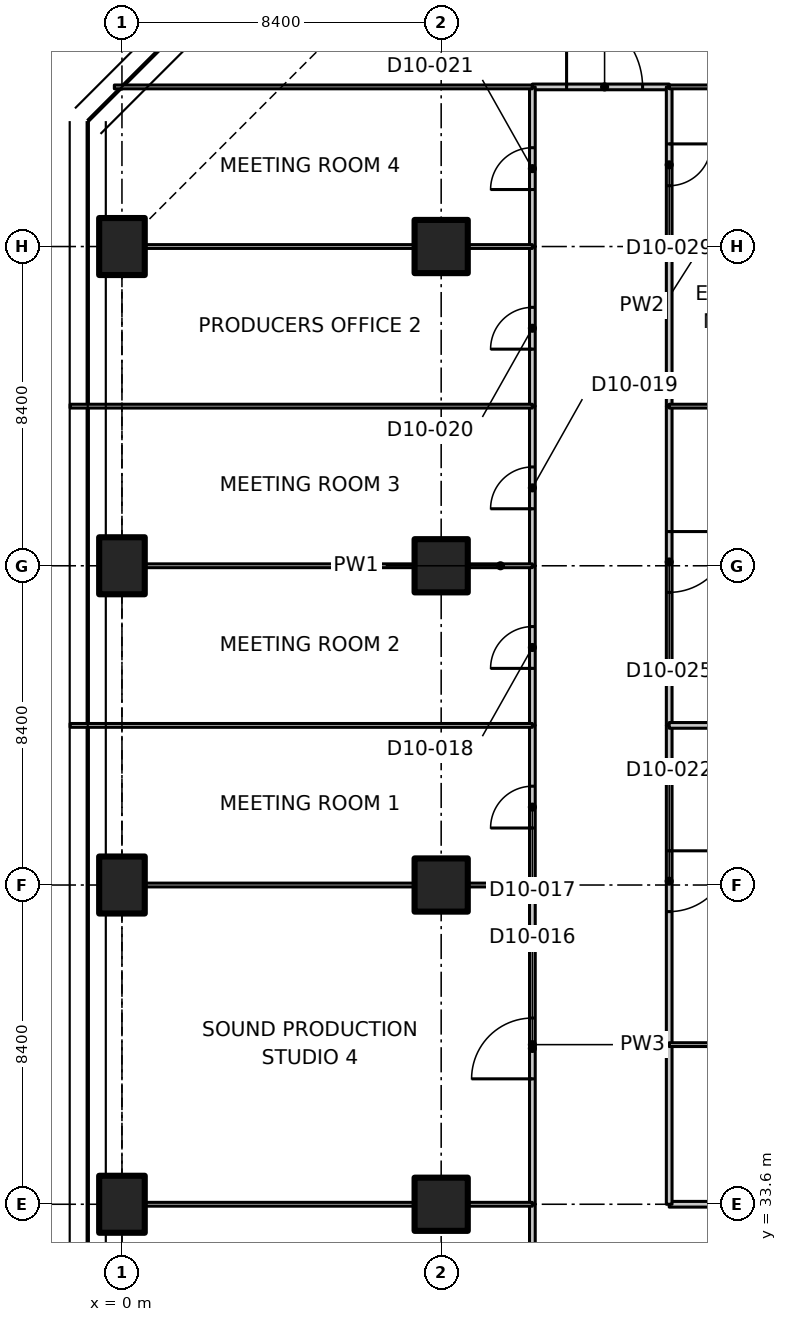
"""IFC4 building model, lengths in metres.
Left out: names, types, materials, properties, quantities, classifications, styles, units other than length and angle.
Written with IfcOpenShell. Run it as: python <this file> out.ifc"""

import sys

from ifc_helpers import new_model, si_unit, direction, frame, frame_2d, origin, origin_2d, place, context, subcontext, project, spatial, polyline, rectangle, outline, extrude, element, fill, save


model = new_model("IFC4")
c1 = context("Model", 3, precision=1e-05, world=origin(), true_north=direction((0.0, 1.0)))
c2 = subcontext(c1, "Body", "Model", "MODEL_VIEW")
j1 = project(units=[si_unit("LENGTHUNIT", "METRE"), si_unit("PLANEANGLEUNIT", "RADIAN")], contexts=[c1])
p1 = place(None, origin())
s1 = spatial("IfcSite", under=j1, at=p1, CompositionType="ELEMENT")
p2 = place(p1, origin())
s2 = spatial("IfcBuilding", under=s1, at=p2, CompositionType="ELEMENT")
p3 = place(p2, frame((0.0, 0.0, 76.1)))
s3 = spatial("IfcBuildingStorey", under=s2, at=p3, CompositionType="ELEMENT", Elevation=76.1)
for number, where, z_axis, x_axis in (
    (1, (0.0, 33.6, 0.0), (0.0, 0.0, 1.0), (1.0, 0.0, 0.0)),
    (2, (0.0, 42.0, 0.0), (0.0, 0.0, 1.0), (1.0, 0.0, 0.0)),
    (3, (0.0, 50.4, 0.0), (0.0, 0.0, 1.0), (1.0, 0.0, 0.0)),
    (4, (0.0, 58.8, 0.0), (0.0, 0.0, 1.0), (1.0, 0.0, 0.0)),
):
    element("IfcColumn", number, at=place(p3, frame(where, z_axis=z_axis, x_axis=x_axis)), inside=s3, PredefinedType="COLUMN", context=c2, shape_type="SweptSolid", body=[
        extrude(rectangle(XDim=1.2, YDim=1.5, at=origin_2d()), origin(), (0.0, 0.0, 1.0), 3.35),
    ])
for number, where, z_axis, x_axis in (
    (5, (8.4, 33.6, 0.0), (0.0, 0.0, 1.0), (1.0, 0.0, 0.0)),
    (6, (8.4, 42.0, 0.0), (0.0, 0.0, 1.0), (1.0, 0.0, 0.0)),
    (7, (8.4, 50.4, 0.0), (0.0, 0.0, 1.0), (1.0, 0.0, 0.0)),
    (8, (8.4, 58.8, 0.0), (0.0, 0.0, 1.0), (1.0, 0.0, 0.0)),
):
    element("IfcColumn", number, at=place(p3, frame(where, z_axis=z_axis, x_axis=x_axis)), inside=s3, PredefinedType="COLUMN", context=c2, shape_type="SweptSolid", body=[
        extrude(rectangle(XDim=1.4, YDim=1.4, at=origin_2d()), origin(), (0.0, 0.0, 1.0), 3.35),
    ])
p4 = place(p3, frame((10.8, 25.2, 0.0), z_axis=(0.0, 0.0, 1.0), x_axis=(0.0, 1.0, 0.0)))
e9 = element("IfcWall", 9, at=p4, inside=s3, PredefinedType="PARTITIONING", context=c2, shape_type="SweptSolid", body=[
    extrude(rectangle(XDim=8.4, YDim=0.15, at=frame_2d((4.2, 0.0))), origin(), (0.0, 0.0, 1.0), 3.33),
])
p5 = place(p4, frame((3.3, 0.0, 0.0)))
e10 = element("IfcOpeningElement", 10, at=p5, cuts=e9, PredefinedType="OPENING", context=c2, shape_type="SweptSolid", body=[
    extrude(rectangle(XDim=1.6, YDim=2.1, at=frame_2d((0.8, 1.05))), frame((0.0, 0.085, 0.0), z_axis=(0.0, -1.0, 0.0), x_axis=(1.0, 0.0, 0.0)), (0.0, 0.0, 1.0), 0.17),
])
p6 = place(p3, frame((14.4, 33.6, 0.0), z_axis=(0.0, 0.0, 1.0), x_axis=(1.0, 0.0, 0.0)))
e11 = element("IfcWall", 11, at=p6, inside=s3, PredefinedType="PARTITIONING", context=c2, shape_type="SweptSolid", body=[
    extrude(rectangle(XDim=1.5, YDim=0.15, at=frame_2d((0.75, 0.0))), origin(), (0.0, 0.0, 1.0), 3.33),
])
p7 = place(p3, frame((10.8, 63.0, 0.0), z_axis=(0.0, 0.0, 1.0), x_axis=(1.0, 0.0, 0.0)))
e12 = element("IfcWall", 12, at=p7, inside=s3, PredefinedType="PARTITIONING", context=c2, shape_type="SweptSolid", body=[
    extrude(rectangle(XDim=3.6, YDim=0.15, at=frame_2d((1.8, 0.0))), origin(), (0.0, 0.0, 1.0), 3.33),
])
p8 = place(p7, frame((0.9, 0.0, 0.0)))
e13 = element("IfcOpeningElement", 13, at=p8, cuts=e12, PredefinedType="OPENING", context=c2, shape_type="SweptSolid", body=[
    extrude(rectangle(XDim=2.0, YDim=2.4, at=frame_2d((1.0, 1.2))), frame((0.0, 0.085, 0.0), z_axis=(0.0, -1.0, 0.0), x_axis=(1.0, 0.0, 0.0)), (0.0, 0.0, 1.0), 0.17),
])
p9 = place(p3, frame((10.8, 33.6, 0.0), z_axis=(0.0, 0.0, 1.0), x_axis=(0.0, 1.0, 0.0)))
e14 = element("IfcWall", 14, at=p9, inside=s3, PredefinedType="PARTITIONING", context=c2, shape_type="SweptSolid", body=[
    extrude(rectangle(XDim=8.4, YDim=0.15, at=frame_2d((4.2, 0.0))), origin(), (0.0, 0.0, 1.0), 3.33),
])
p10 = place(p9, frame((3.3, 0.0, 0.0)))
e15 = element("IfcOpeningElement", 15, at=p10, cuts=e14, PredefinedType="OPENING", context=c2, shape_type="SweptSolid", body=[
    extrude(rectangle(XDim=1.6, YDim=2.1, at=frame_2d((0.8, 1.05))), frame((0.0, 0.085, 0.0), z_axis=(0.0, -1.0, 0.0), x_axis=(1.0, 0.0, 0.0)), (0.0, 0.0, 1.0), 0.17),
])
p11 = place(p3, frame((10.8, 42.0, 0.0), z_axis=(0.0, 0.0, 1.0), x_axis=(0.0, 1.0, 0.0)))
e16 = element("IfcWall", 16, at=p11, inside=s3, PredefinedType="PARTITIONING", context=c2, shape_type="SweptSolid", body=[
    extrude(rectangle(XDim=4.2, YDim=0.15, at=frame_2d((2.1, 0.0))), origin(), (0.0, 0.0, 1.0), 3.33),
])
p12 = place(p11, frame((1.5, 0.0, 0.0)))
e17 = element("IfcOpeningElement", 17, at=p12, cuts=e16, PredefinedType="OPENING", context=c2, shape_type="SweptSolid", body=[
    extrude(rectangle(XDim=1.1, YDim=2.1, at=frame_2d((0.55, 1.05))), frame((0.0, 0.085, 0.0), z_axis=(0.0, -1.0, 0.0), x_axis=(1.0, 0.0, 0.0)), (0.0, 0.0, 1.0), 0.17),
])
p13 = place(p3, frame((10.8, 46.2, 0.0), z_axis=(0.0, 0.0, 1.0), x_axis=(0.0, 1.0, 0.0)))
e18 = element("IfcWall", 18, at=p13, inside=s3, PredefinedType="PARTITIONING", context=c2, shape_type="SweptSolid", body=[
    extrude(rectangle(XDim=4.2, YDim=0.15, at=frame_2d((2.1, 0.0))), origin(), (0.0, 0.0, 1.0), 3.33),
])
p14 = place(p13, frame((1.5, 0.0, 0.0)))
e19 = element("IfcOpeningElement", 19, at=p14, cuts=e18, PredefinedType="OPENING", context=c2, shape_type="SweptSolid", body=[
    extrude(rectangle(XDim=1.1, YDim=2.1, at=frame_2d((0.55, 1.05))), frame((0.0, 0.085, 0.0), z_axis=(0.0, -1.0, 0.0), x_axis=(1.0, 0.0, 0.0)), (0.0, 0.0, 1.0), 0.17),
])
p15 = place(p3, frame((10.8, 50.4, 0.0), z_axis=(0.0, 0.0, 1.0), x_axis=(0.0, 1.0, 0.0)))
e20 = element("IfcWall", 20, at=p15, inside=s3, PredefinedType="PARTITIONING", context=c2, shape_type="SweptSolid", body=[
    extrude(rectangle(XDim=4.2, YDim=0.15, at=frame_2d((2.1, 0.0))), origin(), (0.0, 0.0, 1.0), 3.33),
])
p16 = place(p15, frame((1.5, 0.0, 0.0)))
e21 = element("IfcOpeningElement", 21, at=p16, cuts=e20, PredefinedType="OPENING", context=c2, shape_type="SweptSolid", body=[
    extrude(rectangle(XDim=1.1, YDim=2.1, at=frame_2d((0.55, 1.05))), frame((0.0, 0.085, 0.0), z_axis=(0.0, -1.0, 0.0), x_axis=(1.0, 0.0, 0.0)), (0.0, 0.0, 1.0), 0.17),
])
p17 = place(p3, frame((10.8, 54.6, 0.0), z_axis=(0.0, 0.0, 1.0), x_axis=(0.0, 1.0, 0.0)))
e22 = element("IfcWall", 22, at=p17, inside=s3, PredefinedType="PARTITIONING", context=c2, shape_type="SweptSolid", body=[
    extrude(rectangle(XDim=4.2, YDim=0.15, at=frame_2d((2.1, 0.0))), origin(), (0.0, 0.0, 1.0), 3.33),
])
p18 = place(p17, frame((1.5, 0.0, 0.0)))
e23 = element("IfcOpeningElement", 23, at=p18, cuts=e22, PredefinedType="OPENING", context=c2, shape_type="SweptSolid", body=[
    extrude(rectangle(XDim=1.1, YDim=2.1, at=frame_2d((0.55, 1.05))), frame((0.0, 0.085, 0.0), z_axis=(0.0, -1.0, 0.0), x_axis=(1.0, 0.0, 0.0)), (0.0, 0.0, 1.0), 0.17),
])
p19 = place(p3, frame((10.8, 58.8, 0.0), z_axis=(0.0, 0.0, 1.0), x_axis=(0.0, 1.0, 0.0)))
e24 = element("IfcWall", 24, at=p19, inside=s3, PredefinedType="PARTITIONING", context=c2, shape_type="SweptSolid", body=[
    extrude(rectangle(XDim=4.2, YDim=0.15, at=frame_2d((2.1, 0.0))), origin(), (0.0, 0.0, 1.0), 3.33),
])
p20 = place(p19, frame((1.5, 0.0, 0.0)))
e25 = element("IfcOpeningElement", 25, at=p20, cuts=e24, PredefinedType="OPENING", context=c2, shape_type="SweptSolid", body=[
    extrude(rectangle(XDim=1.1, YDim=2.1, at=frame_2d((0.55, 1.05))), frame((0.0, 0.085, 0.0), z_axis=(0.0, -1.0, 0.0), x_axis=(1.0, 0.0, 0.0)), (0.0, 0.0, 1.0), 0.17),
])
p21 = place(p3, frame((14.4, 46.2, 0.0), z_axis=(0.0, 0.0, 1.0), x_axis=(0.0, -1.0, 0.0)))
e26 = element("IfcWall", 26, at=p21, inside=s3, PredefinedType="PARTITIONING", context=c2, shape_type="SweptSolid", body=[
    extrude(rectangle(XDim=8.4, YDim=0.15, at=frame_2d((4.2, 0.0))), origin(), (0.0, 0.0, 1.0), 3.33),
])
p22 = place(p21, frame((3.3, 0.0, 0.0)))
e27 = element("IfcOpeningElement", 27, at=p22, cuts=e26, PredefinedType="OPENING", context=c2, shape_type="SweptSolid", body=[
    extrude(rectangle(XDim=1.6, YDim=2.1, at=frame_2d((0.8, 1.05))), frame((0.0, 0.085, 0.0), z_axis=(0.0, -1.0, 0.0), x_axis=(1.0, 0.0, 0.0)), (0.0, 0.0, 1.0), 0.17),
])
p23 = place(p3, frame((14.4, 37.8, 0.0), z_axis=(0.0, 0.0, 1.0), x_axis=(0.0, -1.0, 0.0)))
e28 = element("IfcWall", 28, at=p23, inside=s3, PredefinedType="PARTITIONING", context=c2, shape_type="SweptSolid", body=[
    extrude(rectangle(XDim=4.2, YDim=0.15, at=frame_2d((2.1, 0.0))), origin(), (0.0, 0.0, 1.0), 3.33),
])
p24 = place(p3, frame((14.4, 54.6, 0.0), z_axis=(0.0, 0.0, 1.0), x_axis=(0.0, -1.0, 0.0)))
e29 = element("IfcWall", 29, at=p24, inside=s3, PredefinedType="PARTITIONING", context=c2, shape_type="SweptSolid", body=[
    extrude(rectangle(XDim=8.4, YDim=0.15, at=frame_2d((4.2, 0.0))), origin(), (0.0, 0.0, 1.0), 3.33),
])
p25 = place(p24, frame((3.3, 0.0, 0.0)))
e30 = element("IfcOpeningElement", 30, at=p25, cuts=e29, PredefinedType="OPENING", context=c2, shape_type="SweptSolid", body=[
    extrude(rectangle(XDim=1.6, YDim=2.1, at=frame_2d((0.8, 1.05))), frame((0.0, 0.085, 0.0), z_axis=(0.0, -1.0, 0.0), x_axis=(1.0, 0.0, 0.0)), (0.0, 0.0, 1.0), 0.17),
])
p26 = place(p3, frame((14.4, 58.8, 0.0), z_axis=(0.0, 0.0, 1.0), x_axis=(0.0, -1.0, 0.0)))
e31 = element("IfcWall", 31, at=p26, inside=s3, PredefinedType="PARTITIONING", context=c2, shape_type="SweptSolid", body=[
    extrude(rectangle(XDim=4.2, YDim=0.15, at=frame_2d((2.1, 0.0))), origin(), (0.0, 0.0, 1.0), 3.33),
])
p27 = place(p3, frame((14.4, 63.0, 0.0), z_axis=(0.0, 0.0, 1.0), x_axis=(0.0, -1.0, 0.0)))
e32 = element("IfcWall", 32, at=p27, inside=s3, PredefinedType="PARTITIONING", context=c2, shape_type="SweptSolid", body=[
    extrude(rectangle(XDim=4.2, YDim=0.15, at=frame_2d((2.1, 0.0))), origin(), (0.0, 0.0, 1.0), 3.33),
])
p28 = place(p27, frame((1.5, 0.0, 0.0)))
e33 = element("IfcOpeningElement", 33, at=p28, cuts=e32, PredefinedType="OPENING", context=c2, shape_type="SweptSolid", body=[
    extrude(rectangle(XDim=1.1, YDim=2.1, at=frame_2d((0.55, 1.05))), frame((0.0, 0.085, 0.0), z_axis=(0.0, -1.0, 0.0), x_axis=(1.0, 0.0, 0.0)), (0.0, 0.0, 1.0), 0.17),
])
p29 = place(p3, frame((10.8, 63.0, 0.0), z_axis=(0.0, 0.0, 1.0), x_axis=(-1.0, 0.0, 0.0)))
e34 = element("IfcWall", 34, at=p29, inside=s3, PredefinedType="PARTITIONING", context=c2, shape_type="SweptSolid", body=[
    extrude(outline(polyline([(0.0, 0.0), (11.0, 0.0), (11.0, 3.33), (7.266, 3.33), (7.264, 2.98), (5.936, 2.98), (5.934, 3.33), (0.0, 3.33), (0.0, 0.0)])), frame((0.0, 0.05, 0.0), z_axis=(0.0, -1.0, 0.0), x_axis=(1.0, 0.0, 0.0)), (0.0, 0.0, 1.0), 0.1),
])
p30 = place(p3, frame((25.4, 63.0, 0.0), z_axis=(0.0, 0.0, 1.0), x_axis=(-1.0, 0.0, 0.0)))
e35 = element("IfcWall", 35, at=p30, inside=s3, PredefinedType="PARTITIONING", context=c2, shape_type="SweptSolid", body=[
    extrude(outline(polyline([(0.0, 0.0), (11.0, 0.0), (11.0, 3.33), (5.066, 3.33), (5.064, 2.98), (3.736, 2.98), (3.734, 3.33), (0.0, 3.33), (0.0, 0.0)])), frame((0.0, 0.05, 0.0), z_axis=(0.0, -1.0, 0.0), x_axis=(1.0, 0.0, 0.0)), (0.0, 0.0, 1.0), 0.1),
])
p31 = place(p3, frame((0.62, 33.6, 0.0), z_axis=(0.0, 0.0, 1.0), x_axis=(1.0, 0.0, 0.0)))
e36 = element("IfcWall", 36, at=p31, inside=s3, PredefinedType="PARTITIONING", context=c2, shape_type="SweptSolid", body=[
    extrude(rectangle(XDim=7.06, YDim=0.1, at=frame_2d((3.53, 0.0))), origin(), (0.0, 0.0, 1.0), 3.33),
])
p32 = place(p3, frame((9.12, 33.6, 0.0), z_axis=(0.0, 0.0, 1.0), x_axis=(1.0, 0.0, 0.0)))
e37 = element("IfcWall", 37, at=p32, inside=s3, PredefinedType="PARTITIONING", context=c2, shape_type="SweptSolid", body=[
    extrude(rectangle(XDim=1.68, YDim=0.1, at=frame_2d((0.84, 0.0))), origin(), (0.0, 0.0, 1.0), 3.33),
])
p33 = place(p3, frame((0.62, 42.0, 0.0), z_axis=(0.0, 0.0, 1.0), x_axis=(1.0, 0.0, 0.0)))
e38 = element("IfcWall", 38, at=p33, inside=s3, PredefinedType="PARTITIONING", context=c2, shape_type="SweptSolid", body=[
    extrude(rectangle(XDim=7.06, YDim=0.1, at=frame_2d((3.53, 0.0))), origin(), (0.0, 0.0, 1.0), 3.33),
])
p34 = place(p3, frame((9.12, 42.0, 0.0), z_axis=(0.0, 0.0, 1.0), x_axis=(1.0, 0.0, 0.0)))
e39 = element("IfcWall", 39, at=p34, inside=s3, PredefinedType="PARTITIONING", context=c2, shape_type="SweptSolid", body=[
    extrude(rectangle(XDim=1.68, YDim=0.1, at=frame_2d((0.84, 0.0))), origin(), (0.0, 0.0, 1.0), 3.33),
])
p35 = place(p3, frame((-1.365, 46.2, 0.0), z_axis=(0.0, 0.0, 1.0), x_axis=(1.0, 0.0, 0.0)))
e40 = element("IfcWall", 40, at=p35, inside=s3, PredefinedType="PARTITIONING", context=c2, shape_type="SweptSolid", body=[
    extrude(outline(polyline([(0.0, 0.0), (12.165, 0.0), (12.165, 3.33), (1.815, 3.33), (1.813, 2.98), (0.917, 2.98), (0.915, 3.33), (0.265, 3.33), (0.0, 3.33), (0.0, 0.0)])), frame((0.0, 0.05, 0.0), z_axis=(0.0, -1.0, 0.0), x_axis=(1.0, 0.0, 0.0)), (0.0, 0.0, 1.0), 0.1),
])
p36 = place(p3, frame((0.62, 50.4, 0.0), z_axis=(0.0, 0.0, 1.0), x_axis=(1.0, 0.0, 0.0)))
e41 = element("IfcWall", 41, at=p36, inside=s3, PredefinedType="PARTITIONING", context=c2, shape_type="SweptSolid", body=[
    extrude(rectangle(XDim=7.06, YDim=0.1, at=frame_2d((3.53, 0.0))), origin(), (0.0, 0.0, 1.0), 3.33),
])
p37 = place(p3, frame((9.12, 50.4, 0.0), z_axis=(0.0, 0.0, 1.0), x_axis=(1.0, 0.0, 0.0)))
e42 = element("IfcWall", 42, at=p37, inside=s3, PredefinedType="PARTITIONING", context=c2, shape_type="SweptSolid", body=[
    extrude(rectangle(XDim=1.68, YDim=0.1, at=frame_2d((0.84, 0.0))), origin(), (0.0, 0.0, 1.0), 3.33),
])
p38 = place(p3, frame((-1.365, 54.6, 0.0), z_axis=(0.0, 0.0, 1.0), x_axis=(1.0, 0.0, 0.0)))
e43 = element("IfcWall", 43, at=p38, inside=s3, PredefinedType="PARTITIONING", context=c2, shape_type="SweptSolid", body=[
    extrude(outline(polyline([(0.0, 0.0), (12.165, 0.0), (12.165, 3.33), (1.815, 3.33), (1.813, 2.98), (0.917, 2.98), (0.915, 3.33), (0.265, 3.33), (0.0, 3.33), (0.0, 0.0)])), frame((0.0, 0.05, 0.0), z_axis=(0.0, -1.0, 0.0), x_axis=(1.0, 0.0, 0.0)), (0.0, 0.0, 1.0), 0.1),
])
p39 = place(p3, frame((0.62, 58.8, 0.0), z_axis=(0.0, 0.0, 1.0), x_axis=(1.0, 0.0, 0.0)))
e44 = element("IfcWall", 44, at=p39, inside=s3, PredefinedType="PARTITIONING", context=c2, shape_type="SweptSolid", body=[
    extrude(rectangle(XDim=7.06, YDim=0.1, at=frame_2d((3.53, 0.0))), origin(), (0.0, 0.0, 1.0), 3.33),
])
p40 = place(p3, frame((9.12, 58.8, 0.0), z_axis=(0.0, 0.0, 1.0), x_axis=(1.0, 0.0, 0.0)))
e45 = element("IfcWall", 45, at=p40, inside=s3, PredefinedType="PARTITIONING", context=c2, shape_type="SweptSolid", body=[
    extrude(rectangle(XDim=1.68, YDim=0.1, at=frame_2d((0.84, 0.0))), origin(), (0.0, 0.0, 1.0), 3.33),
])
p41 = place(p3, frame((24.0, 37.8, 0.0), z_axis=(0.0, 0.0, 1.0), x_axis=(-1.0, 0.0, 0.0)))
e46 = element("IfcWall", 46, at=p41, inside=s3, PredefinedType="PARTITIONING", context=c2, shape_type="SweptSolid", body=[
    extrude(rectangle(XDim=9.6, YDim=0.1, at=frame_2d((4.8, 0.0))), origin(), (0.0, 0.0, 1.0), 3.33),
])
p42 = place(p41, frame((4.2, 0.0, 0.0)))
e47 = element("IfcOpeningElement", 47, at=p42, cuts=e46, PredefinedType="OPENING", context=c2, shape_type="SweptSolid", body=[
    extrude(rectangle(XDim=1.2, YDim=2.1, at=frame_2d((0.6, 1.05))), frame((0.0, 0.06, 0.0), z_axis=(0.0, -1.0, 0.0), x_axis=(1.0, 0.0, 0.0)), (0.0, 0.0, 1.0), 0.12),
])
p43 = place(p3, frame((14.4, 46.2, 0.0), z_axis=(0.0, 0.0, 1.0), x_axis=(1.0, 0.0, 0.0)))
e48 = element("IfcWall", 48, at=p43, inside=s3, PredefinedType="PARTITIONING", context=c2, shape_type="SweptSolid", body=[
    extrude(outline(polyline([(0.0, 0.0), (12.165, 0.0), (12.165, 3.33), (11.9, 3.33), (11.25, 3.33), (11.248, 2.98), (10.352, 2.98), (10.35, 3.33), (0.0, 3.33), (0.0, 0.0)])), frame((0.0, 0.075, 0.0), z_axis=(0.0, -1.0, 0.0), x_axis=(1.0, 0.0, 0.0)), (0.0, 0.0, 1.0), 0.15),
])
p44 = place(p3, frame((14.4, 54.6, 0.0), z_axis=(0.0, 0.0, 1.0), x_axis=(1.0, 0.0, 0.0)))
e49 = element("IfcWall", 49, at=p44, inside=s3, PredefinedType="PARTITIONING", context=c2, shape_type="SweptSolid", body=[
    extrude(rectangle(XDim=4.2, YDim=0.1, at=frame_2d((2.1, 0.0))), origin(), (0.0, 0.0, 1.0), 3.33),
])
p45 = place(p44, frame((1.8, 0.0, 0.0)))
e50 = element("IfcOpeningElement", 50, at=p45, cuts=e49, PredefinedType="OPENING", context=c2, shape_type="SweptSolid", body=[
    extrude(rectangle(XDim=0.9, YDim=2.1, at=frame_2d((0.45, 1.05))), frame((0.0, 0.06, 0.0), z_axis=(0.0, -1.0, 0.0), x_axis=(1.0, 0.0, 0.0)), (0.0, 0.0, 1.0), 0.12),
])
p46 = place(p3, frame((14.4, 58.8, 0.0), z_axis=(0.0, 0.0, 1.0), x_axis=(1.0, 0.0, 0.0)))
e51 = element("IfcWall", 51, at=p46, inside=s3, PredefinedType="PARTITIONING", context=c2, shape_type="SweptSolid", body=[
    extrude(rectangle(XDim=1.68, YDim=0.125, at=frame_2d((0.84, 0.0))), origin(), (0.0, 0.0, 1.0), 3.33),
])
p47 = place(p8, origin())
e52 = element("IfcDoor", 52, at=p47, inside=s3, OperationType="DOUBLE_DOOR_SINGLE_SWING", PredefinedType="DOOR", context=c2, shape_type="SweptSolid", body=[
    extrude(rectangle(XDim=2.0, YDim=2.4, at=frame_2d((1.0, 1.2))), frame((0.0, 0.025, 0.0), z_axis=(0.0, -1.0, 0.0), x_axis=(1.0, 0.0, 0.0)), (0.0, 0.0, 1.0), 0.05),
])
fill(e13, e52)
p48 = place(p10, origin())
e53 = element("IfcDoor", 53, at=p48, inside=s3, OperationType="DOUBLE_DOOR_SINGLE_SWING", PredefinedType="DOOR", context=c2, shape_type="SweptSolid", body=[
    extrude(rectangle(XDim=1.6, YDim=2.1, at=frame_2d((0.8, 1.05))), frame((0.0, 0.025, 0.0), z_axis=(0.0, -1.0, 0.0), x_axis=(1.0, 0.0, 0.0)), (0.0, 0.0, 1.0), 0.05),
])
fill(e15, e53)
p49 = place(p12, origin())
e54 = element("IfcDoor", 54, at=p49, inside=s3, OperationType="SINGLE_SWING_LEFT", PredefinedType="DOOR", context=c2, shape_type="SweptSolid", body=[
    extrude(rectangle(XDim=1.1, YDim=2.1, at=frame_2d((0.55, 1.05))), frame((0.0, 0.025, 0.0), z_axis=(0.0, -1.0, 0.0), x_axis=(1.0, 0.0, 0.0)), (0.0, 0.0, 1.0), 0.05),
])
fill(e17, e54)
p50 = place(p14, origin())
e55 = element("IfcDoor", 55, at=p50, inside=s3, OperationType="SINGLE_SWING_LEFT", PredefinedType="DOOR", context=c2, shape_type="SweptSolid", body=[
    extrude(rectangle(XDim=1.1, YDim=2.1, at=frame_2d((0.55, 1.05))), frame((0.0, 0.025, 0.0), z_axis=(0.0, -1.0, 0.0), x_axis=(1.0, 0.0, 0.0)), (0.0, 0.0, 1.0), 0.05),
])
fill(e19, e55)
p51 = place(p16, origin())
e56 = element("IfcDoor", 56, at=p51, inside=s3, OperationType="SINGLE_SWING_LEFT", PredefinedType="DOOR", context=c2, shape_type="SweptSolid", body=[
    extrude(rectangle(XDim=1.1, YDim=2.1, at=frame_2d((0.55, 1.05))), frame((0.0, 0.025, 0.0), z_axis=(0.0, -1.0, 0.0), x_axis=(1.0, 0.0, 0.0)), (0.0, 0.0, 1.0), 0.05),
])
fill(e21, e56)
p52 = place(p18, origin())
e57 = element("IfcDoor", 57, at=p52, inside=s3, OperationType="SINGLE_SWING_LEFT", PredefinedType="DOOR", context=c2, shape_type="SweptSolid", body=[
    extrude(rectangle(XDim=1.1, YDim=2.1, at=frame_2d((0.55, 1.05))), frame((0.0, 0.025, 0.0), z_axis=(0.0, -1.0, 0.0), x_axis=(1.0, 0.0, 0.0)), (0.0, 0.0, 1.0), 0.05),
])
fill(e23, e57)
p53 = place(p20, origin())
e58 = element("IfcDoor", 58, at=p53, inside=s3, OperationType="SINGLE_SWING_LEFT", PredefinedType="DOOR", context=c2, shape_type="SweptSolid", body=[
    extrude(rectangle(XDim=1.1, YDim=2.1, at=frame_2d((0.55, 1.05))), frame((0.0, 0.025, 0.0), z_axis=(0.0, -1.0, 0.0), x_axis=(1.0, 0.0, 0.0)), (0.0, 0.0, 1.0), 0.05),
])
fill(e25, e58)
p54 = place(p22, origin())
e59 = element("IfcDoor", 59, at=p54, inside=s3, OperationType="DOUBLE_DOOR_SINGLE_SWING", PredefinedType="DOOR", context=c2, shape_type="SweptSolid", body=[
    extrude(rectangle(XDim=1.6, YDim=2.1, at=frame_2d((0.8, 1.05))), frame((0.0, 0.025, 0.0), z_axis=(0.0, -1.0, 0.0), x_axis=(1.0, 0.0, 0.0)), (0.0, 0.0, 1.0), 0.05),
])
fill(e27, e59)
p55 = place(p25, origin())
e60 = element("IfcDoor", 60, at=p55, inside=s3, OperationType="DOUBLE_DOOR_SINGLE_SWING", PredefinedType="DOOR", context=c2, shape_type="SweptSolid", body=[
    extrude(rectangle(XDim=1.6, YDim=2.1, at=frame_2d((0.8, 1.05))), frame((0.0, 0.025, 0.0), z_axis=(0.0, -1.0, 0.0), x_axis=(1.0, 0.0, 0.0)), (0.0, 0.0, 1.0), 0.05),
])
fill(e30, e60)
p56 = place(p28, origin())
e61 = element("IfcDoor", 61, at=p56, inside=s3, OperationType="SINGLE_SWING_LEFT", PredefinedType="DOOR", context=c2, shape_type="SweptSolid", body=[
    extrude(rectangle(XDim=1.1, YDim=2.1, at=frame_2d((0.55, 1.05))), frame((0.0, 0.025, 0.0), z_axis=(0.0, -1.0, 0.0), x_axis=(1.0, 0.0, 0.0)), (0.0, 0.0, 1.0), 0.05),
])
fill(e33, e61)
save(model, sys.argv[1])
